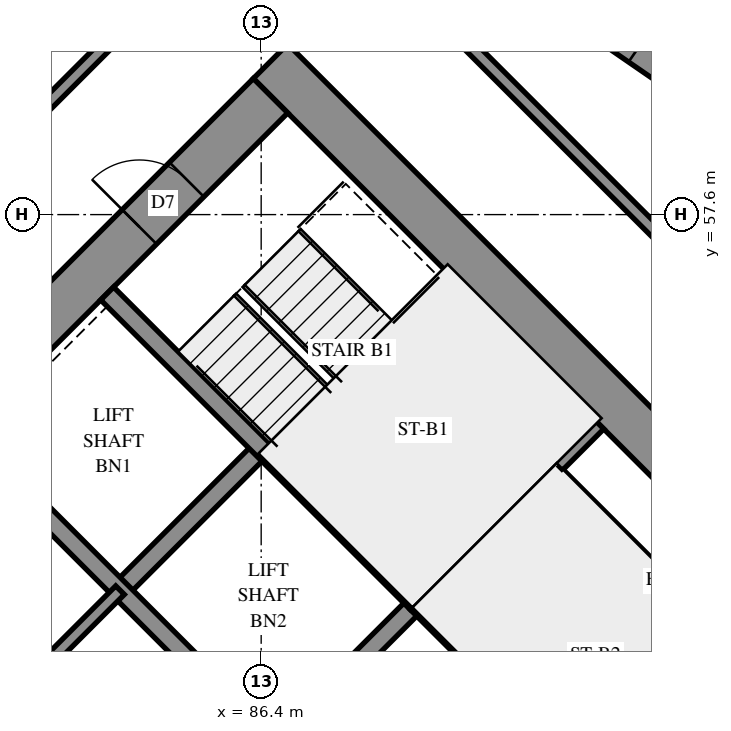
"""IFC4 building model, lengths in metres.
Left out: names, types, materials, properties, quantities, classifications, styles, units other than length and angle.
Written with IfcOpenShell. Run it as: python <this file> out.ifc"""

import sys

from ifc_helpers import new_model, si_unit, direction, frame, frame_2d, origin, place, context, subcontext, project, spatial, polyline, rectangle, outline, extrude, element, fill, save


model = new_model("IFC4")
c1 = context("Model", 3, precision=1e-05, world=origin(), true_north=direction((0.0, 1.0)))
c2 = subcontext(c1, "Body", "Model", "MODEL_VIEW")
j1 = project(units=[si_unit("LENGTHUNIT", "METRE"), si_unit("PLANEANGLEUNIT", "RADIAN")], contexts=[c1])
p1 = place(None, origin())
s1 = spatial("IfcSite", under=j1, at=p1, CompositionType="ELEMENT")
p2 = place(p1, origin())
s2 = spatial("IfcBuilding", under=s1, at=p2, CompositionType="ELEMENT")
p3 = place(p2, frame((0.0, 0.0, 118.6)))
s3 = spatial("IfcBuildingStorey", under=s2, at=p3, CompositionType="ELEMENT", Elevation=118.6)
p4 = place(p3, frame((86.554, 60.121, -0.3), z_axis=(0.0, 0.0, 1.0), x_axis=(0.7071067812, -0.7071067812, 0.0)))
e1 = element("IfcWall", 1, at=p4, inside=s3, PredefinedType="SHEAR", context=c2, shape_type="SweptSolid", body=[
    extrude(rectangle(XDim=16.0, YDim=0.8, at=frame_2d((8.0, 0.0))), origin(), (0.0, 0.0, 1.0), 2.7),
])
p5 = place(p4, frame((10.8, 0.0, 0.3)))
e2 = element("IfcOpeningElement", 2, at=p5, cuts=e1, PredefinedType="OPENING", context=c2, shape_type="SweptSolid", body=[
    extrude(rectangle(XDim=0.8, YDim=2.1, at=frame_2d((0.4, 1.05))), frame((0.0, 0.41, 0.0), z_axis=(0.0, -1.0, 0.0), x_axis=(1.0, 0.0, 0.0)), (0.0, 0.0, 1.0), 0.82),
])
p6 = place(p3, frame((76.372, 49.373, -0.3), z_axis=(0.0, 0.0, 1.0), x_axis=(0.7071067812, 0.7071067812, 0.0)))
e3 = element("IfcWall", 3, at=p6, inside=s3, PredefinedType="SHEAR", context=c2, shape_type="SweptSolid", body=[
    extrude(rectangle(XDim=14.4, YDim=0.8, at=frame_2d((7.2, 0.0))), origin(), (0.0, 0.0, 1.0), 2.7),
])
p7 = place(p6, frame((4.55, 0.0, 0.3)))
e4 = element("IfcOpeningElement", 4, at=p7, cuts=e3, PredefinedType="OPENING", context=c2, shape_type="SweptSolid", body=[
    extrude(rectangle(XDim=1.1, YDim=2.1, at=frame_2d((0.55, 1.05))), frame((0.0, 0.41, 0.0), z_axis=(0.0, -1.0, 0.0), x_axis=(1.0, 0.0, 0.0)), (0.0, 0.0, 1.0), 0.82),
])
p8 = place(p6, frame((11.35, 0.0, 0.3)))
e5 = element("IfcOpeningElement", 5, at=p8, cuts=e3, PredefinedType="OPENING", context=c2, shape_type="SweptSolid", body=[
    extrude(rectangle(XDim=1.1, YDim=2.1, at=frame_2d((0.55, 1.05))), frame((0.0, 0.41, 0.0), z_axis=(0.0, -1.0, 0.0), x_axis=(1.0, 0.0, 0.0)), (0.0, 0.0, 1.0), 0.82),
])
p9 = place(p3, frame((84.079, 51.423, 0.0), z_axis=(0.0, 0.0, 1.0), x_axis=(0.7071219326, 0.7070916295, 0.0)))
e6 = element("IfcWall", 6, at=p9, inside=s3, PredefinedType="SOLIDWALL", context=c2, shape_type="SweptSolid", body=[
    extrude(rectangle(XDim=3.3, YDim=0.3, at=frame_2d((1.65, 0.0))), origin(), (0.0, 0.0, 1.0), 3.1),
])
p10 = place(p3, frame((86.625, 48.878, 0.0), z_axis=(0.0, 0.0, 1.0), x_axis=(0.7071067812, 0.7071067812, 0.0)))
e7 = element("IfcWall", 7, at=p10, inside=s3, PredefinedType="SOLIDWALL", context=c2, shape_type="SweptSolid", body=[
    extrude(rectangle(XDim=3.3, YDim=0.3, at=frame_2d((1.65, 0.0))), origin(), (0.0, 0.0, 1.0), 3.1),
])
p11 = place(p3, frame((78.988, 51.423, 0.0), z_axis=(0.0, 0.0, 1.0), x_axis=(0.7071067812, -0.7071067812, 0.0)))
e8 = element("IfcWall", 8, at=p11, inside=s3, PredefinedType="SOLIDWALL", context=c2, shape_type="SweptSolid", body=[
    extrude(rectangle(XDim=14.4, YDim=0.3, at=frame_2d((7.2, 0.0))), origin(), (0.0, 0.0, 1.0), 3.1),
])
p12 = place(p11, frame((1.25, 0.0, 0.0)))
e9 = element("IfcOpeningElement", 9, at=p12, cuts=e8, PredefinedType="OPENING", context=c2, shape_type="SweptSolid", body=[
    extrude(rectangle(XDim=1.1, YDim=2.1, at=frame_2d((0.55, 1.05))), frame((0.0, 0.16, 0.0), z_axis=(0.0, -1.0, 0.0), x_axis=(1.0, 0.0, 0.0)), (0.0, 0.0, 1.0), 0.32),
])
p13 = place(p11, frame((4.85, 0.0, 0.0)))
e10 = element("IfcOpeningElement", 10, at=p13, cuts=e8, PredefinedType="OPENING", context=c2, shape_type="SweptSolid", body=[
    extrude(rectangle(XDim=1.1, YDim=2.1, at=frame_2d((0.55, 1.05))), frame((0.0, 0.16, 0.0), z_axis=(0.0, -1.0, 0.0), x_axis=(1.0, 0.0, 0.0)), (0.0, 0.0, 1.0), 0.32),
])
p14 = place(p11, frame((8.45, 0.0, 0.0)))
e11 = element("IfcOpeningElement", 11, at=p14, cuts=e8, PredefinedType="OPENING", context=c2, shape_type="SweptSolid", body=[
    extrude(rectangle(XDim=1.1, YDim=2.1, at=frame_2d((0.55, 1.05))), frame((0.0, 0.16, 0.0), z_axis=(0.0, -1.0, 0.0), x_axis=(1.0, 0.0, 0.0)), (0.0, 0.0, 1.0), 0.32),
])
p15 = place(p11, frame((12.05, 0.0, 0.0)))
e12 = element("IfcOpeningElement", 12, at=p15, cuts=e8, PredefinedType="OPENING", context=c2, shape_type="SweptSolid", body=[
    extrude(rectangle(XDim=1.1, YDim=2.1, at=frame_2d((0.55, 1.05))), frame((0.0, 0.16, 0.0), z_axis=(0.0, -1.0, 0.0), x_axis=(1.0, 0.0, 0.0)), (0.0, 0.0, 1.0), 0.32),
])
p16 = place(p3, frame((81.534, 53.969, 0.0), z_axis=(0.0, 0.0, 1.0), x_axis=(0.707103309, -0.7071102534, 0.0)))
e13 = element("IfcWall", 13, at=p16, inside=s3, PredefinedType="SOLIDWALL", context=c2, shape_type="SweptSolid", body=[
    extrude(rectangle(XDim=14.4, YDim=0.3, at=frame_2d((7.2, 0.0))), origin(), (0.0, 0.0, 1.0), 3.1),
])
p17 = place(p16, frame((12.05, 0.0, 0.0)))
e14 = element("IfcOpeningElement", 14, at=p17, cuts=e13, PredefinedType="OPENING", context=c2, shape_type="SweptSolid", body=[
    extrude(rectangle(XDim=1.1, YDim=2.1, at=frame_2d((0.55, 1.05))), frame((0.0, 0.16, 0.0), z_axis=(0.0, -1.0, 0.0), x_axis=(1.0, 0.0, 0.0)), (0.0, 0.0, 1.0), 0.32),
])
for number, where, z_axis, x_axis in (
    (15, (83.867, 56.302, 0.0), (0.0, 0.0, 1.0), (0.707, -0.707, 0.0)),
    (16, (88.958, 51.211, 0.0), (0.0, 0.0, 1.0), (0.707, -0.707, 0.0)),
):
    element("IfcWall", number, at=place(p3, frame(where, z_axis=z_axis, x_axis=x_axis)), inside=s3, PredefinedType="SOLIDWALL", context=c2, shape_type="SweptSolid", body=[
        extrude(rectangle(XDim=7.2, YDim=0.3, at=frame_2d((3.6, 0.0))), origin(), (0.0, 0.0, 1.0), 3.1),
    ])
p18 = place(p3, frame((88.958, 51.211, 0.0), z_axis=(0.0, 0.0, 1.0), x_axis=(0.7071067812, 0.7071067812, 0.0)))
e17 = element("IfcWall", 17, at=p18, inside=s3, PredefinedType="SOLIDWALL", context=c2, shape_type="SweptSolid", body=[
    extrude(rectangle(XDim=4.2, YDim=0.3, at=frame_2d((2.1, 0.0))), origin(), (0.0, 0.0, 1.0), 3.1),
])
p19 = place(p3, frame((94.07, 59.322, 0.0), z_axis=(0.0, 0.0, 1.0), x_axis=(-0.8236459911, 0.567104295, 0.0)))
e18 = element("IfcWall", 18, at=p19, inside=s3, PredefinedType="SOLIDWALL", context=c2, shape_type="SweptSolid", body=[
    extrude(outline(polyline([(-0.051, -0.275), (3.422, -0.275), (3.523, 0.275), (0.051, 0.275), (-0.051, -0.275)])), origin(), (0.0, 0.0, 1.0), 3.1),
])
p20 = place(p19, frame((1.789, 0.0, 0.5)))
e19 = element("IfcOpeningElement", 19, at=p20, cuts=e18, PredefinedType="OPENING", context=c2, shape_type="SweptSolid", body=[
    extrude(rectangle(XDim=1.2, YDim=2.45, at=frame_2d((0.6, 1.225))), frame((0.0, 0.285, 0.0), z_axis=(0.0, -1.0, 0.0), x_axis=(1.0, 0.0, 0.0)), (0.0, 0.0, 1.0), 0.57),
])
p21 = place(p3, frame((91.313, 53.354, 0.0), z_axis=(0.0, 0.0, 1.0), x_axis=(0.7071067812, -0.7071067812, 0.0)))
e20 = element("IfcWall", 20, at=p21, inside=s3, PredefinedType="PARTITIONING", context=c2, shape_type="SweptSolid", body=[
    extrude(rectangle(XDim=5.65, YDim=0.15, at=frame_2d((2.825, 0.0))), origin(), (0.0, 0.0, 1.0), 3.1),
])
p22 = place(p3, frame((81.534, 48.878, 0.0), z_axis=(0.0, 0.0, 1.0), x_axis=(0.707092892, 0.7071206701, 0.0)))
e21 = element("IfcWall", 21, at=p22, inside=s3, PredefinedType="PARTITIONING", context=c2, shape_type="SweptSolid", body=[
    extrude(rectangle(XDim=3.6, YDim=0.2, at=frame_2d((1.8, 0.0))), origin(), (0.0, 0.0, 1.0), 3.1),
])
p23 = place(p3, frame((80.949, 58.477, 0.0), z_axis=(0.0, 0.0, 1.0), x_axis=(0.7071121838, 0.7071013786, 0.0)))
e22 = element("IfcWall", 22, at=p23, inside=s3, PredefinedType="PARTITIONING", context=c2, shape_type="SweptSolid", body=[
    extrude(rectangle(XDim=9.255, YDim=0.2, at=frame_2d((4.627, 0.0))), origin(), (0.0, 0.0, 1.0), 3.1),
])
p24 = place(p3, frame((81.322, 57.858, 0.0), z_axis=(0.0, 0.0, 1.0), x_axis=(0.7069785544, 0.7072349848, 0.0)))
e23 = element("IfcWall", 23, at=p24, inside=s3, PredefinedType="PARTITIONING", context=c2, shape_type="SweptSolid", body=[
    extrude(rectangle(XDim=7.799, YDim=0.2, at=frame_2d((3.9, 0.0))), origin(), (0.0, 0.0, 1.0), 3.1),
])
p25 = place(p3, frame((88.889, 61.315, 0.0), z_axis=(0.0, 0.0, 1.0), x_axis=(0.7071067812, -0.7071067812, 0.0)))
e24 = element("IfcWall", 24, at=p25, inside=s3, PredefinedType="PARTITIONING", context=c2, shape_type="SweptSolid", body=[
    extrude(rectangle(XDim=7.187, YDim=0.2, at=frame_2d((3.594, 0.0))), origin(), (0.0, 0.0, 1.0), 3.1),
])
p26 = place(p20, origin())
e25 = element("IfcWindow", 25, at=p26, inside=s3, PartitioningType="SINGLE_PANEL", PredefinedType="WINDOW", context=c2, shape_type="SweptSolid", body=[
    extrude(rectangle(XDim=1.2, YDim=2.45, at=frame_2d((0.6, 1.225))), frame((0.0, 0.155, 0.0), z_axis=(0.0, -1.0, 0.0), x_axis=(1.0, 0.0, 0.0)), (0.0, 0.0, 1.0), 0.06),
])
fill(e19, e25)
p27 = place(p8, origin())
e26 = element("IfcDoor", 26, at=p27, inside=s3, OperationType="SINGLE_SWING_LEFT", PredefinedType="DOOR", context=c2, shape_type="SweptSolid", body=[
    extrude(rectangle(XDim=1.1, YDim=2.1, at=frame_2d((0.55, 1.05))), frame((0.0, 0.025, 0.0), z_axis=(0.0, -1.0, 0.0), x_axis=(1.0, 0.0, 0.0)), (0.0, 0.0, 1.0), 0.05),
])
fill(e5, e26)
save(model, sys.argv[1])
